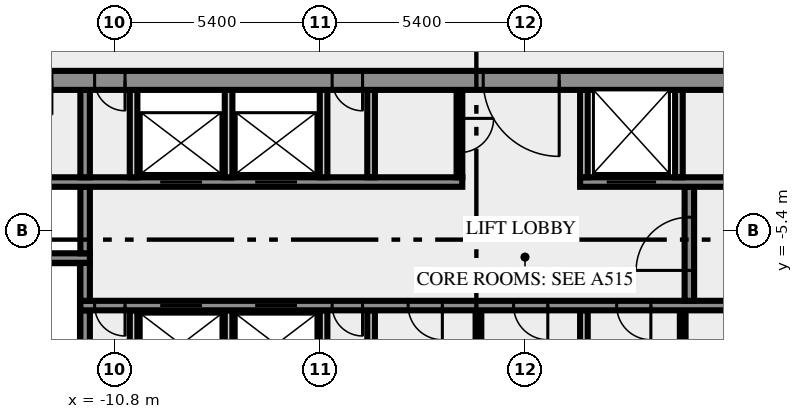
"""IFC4 building model, lengths in metres.
Left out: names, types, materials, properties, quantities, classifications, styles, units other than length and angle.
Written with IfcOpenShell. Run it as: python <this file> out.ifc"""

import sys

from ifc_helpers import new_model, si_unit, direction, frame, frame_2d, origin, place, context, subcontext, project, spatial, rectangle, extrude, element, fill, save


model = new_model("IFC4")
c1 = context("Model", 3, precision=1e-05, world=origin(), true_north=direction((0.0, 1.0)))
c2 = subcontext(c1, "Body", "Model", "MODEL_VIEW")
j1 = project(units=[si_unit("LENGTHUNIT", "METRE"), si_unit("PLANEANGLEUNIT", "RADIAN")], contexts=[c1])
p1 = place(None, origin())
s1 = spatial("IfcSite", under=j1, at=p1, CompositionType="ELEMENT")
p2 = place(p1, origin())
s2 = spatial("IfcBuilding", under=s1, at=p2, CompositionType="ELEMENT")
p3 = place(p2, frame((0.0, 0.0, 297.0)))
s3 = spatial("IfcBuildingStorey", under=s2, at=p3, CompositionType="ELEMENT", Elevation=297.0)
p4 = place(p3, frame((-11.575, -10.5, 0.0), z_axis=(0.0, 0.0, 1.0), x_axis=(0.0, 1.0, 0.0)))
e1 = element("IfcWall", 1, at=p4, inside=s3, PredefinedType="SHEAR", context=c2, shape_type="SweptSolid", body=[
    extrude(rectangle(XDim=3.0, YDim=0.25, at=frame_2d((1.5, 0.0))), origin(), (0.0, 0.0, 1.0), 3.4),
])
for number, where, z_axis, x_axis in (
    (2, (-10.3, -10.5, 0.0), (0.0, 0.0, 1.0), (0.0, 1.0, 0.0)),
    (3, (-7.8, -10.5, 0.0), (0.0, 0.0, 1.0), (0.0, 1.0, 0.0)),
    (4, (-5.3, -10.5, 0.0), (0.0, 0.0, 1.0), (0.0, 1.0, 0.0)),
    (5, (-4.05, -10.5, 0.0), (0.0, 0.0, 1.0), (0.0, 1.0, 0.0)),
):
    element("IfcWall", number, at=place(p3, frame(where, z_axis=z_axis, x_axis=x_axis)), inside=s3, PredefinedType="SOLIDWALL", context=c2, shape_type="SweptSolid", body=[
        extrude(rectangle(XDim=3.0, YDim=0.2, at=frame_2d((1.5, 0.0))), origin(), (0.0, 0.0, 1.0), 3.4),
    ])
p5 = place(p3, frame((-1.225, -10.5, 0.0), z_axis=(0.0, 0.0, 1.0), x_axis=(0.0, 1.0, 0.0)))
e6 = element("IfcWall", 6, at=p5, inside=s3, PredefinedType="PARTITIONING", context=c2, shape_type="SweptSolid", body=[
    extrude(rectangle(XDim=3.0, YDim=0.15, at=frame_2d((1.5, 0.0))), origin(), (0.0, 0.0, 1.0), 3.4),
])
p6 = place(p3, frame((1.55, -10.5, 0.0), z_axis=(0.0, 0.0, 1.0), x_axis=(0.0, 1.0, 0.0)))
e7 = element("IfcWall", 7, at=p6, inside=s3, PredefinedType="SOLIDWALL", context=c2, shape_type="SweptSolid", body=[
    extrude(rectangle(XDim=3.0, YDim=0.2, at=frame_2d((1.5, 0.0))), origin(), (0.0, 0.0, 1.0), 3.4),
])
p7 = place(p3, frame((4.15, -10.5, 0.0), z_axis=(0.0, 0.0, 1.0), x_axis=(0.0, 1.0, 0.0)))
e8 = element("IfcWall", 8, at=p7, inside=s3, PredefinedType="PARTITIONING", context=c2, shape_type="SweptSolid", body=[
    extrude(rectangle(XDim=3.0, YDim=0.15, at=frame_2d((1.5, 0.0))), origin(), (0.0, 0.0, 1.0), 3.4),
])
p8 = place(p3, frame((11.7, -7.375, 0.0), z_axis=(0.0, 0.0, 1.0), x_axis=(-1.0, 0.0, 0.0)))
e9 = element("IfcWall", 9, at=p8, inside=s3, PredefinedType="SHEAR", context=c2, shape_type="SweptSolid", body=[
    extrude(rectangle(XDim=23.4, YDim=0.25, at=frame_2d((11.7, 0.0))), origin(), (0.0, 0.0, 1.0), 3.4),
])
p9 = place(p8, frame((22.225, 0.0, 0.0)))
e10 = element("IfcOpeningElement", 10, at=p9, cuts=e9, PredefinedType="OPENING", context=c2, shape_type="SweptSolid", body=[
    extrude(rectangle(XDim=0.8, YDim=2.1, at=frame_2d((0.4, 1.05))), frame((0.0, 0.135, 0.0), z_axis=(0.0, -1.0, 0.0), x_axis=(1.0, 0.0, 0.0)), (0.0, 0.0, 1.0), 0.27),
])
p10 = place(p8, frame((20.2, 0.0, 0.0)))
e11 = element("IfcOpeningElement", 11, at=p10, cuts=e9, PredefinedType="OPENING", context=c2, shape_type="SweptSolid", body=[
    extrude(rectangle(XDim=1.1, YDim=2.1, at=frame_2d((0.55, 1.05))), frame((0.0, 0.135, 0.0), z_axis=(0.0, -1.0, 0.0), x_axis=(1.0, 0.0, 0.0)), (0.0, 0.0, 1.0), 0.27),
])
p11 = place(p8, frame((17.7, 0.0, 0.0)))
e12 = element("IfcOpeningElement", 12, at=p11, cuts=e9, PredefinedType="OPENING", context=c2, shape_type="SweptSolid", body=[
    extrude(rectangle(XDim=1.1, YDim=2.1, at=frame_2d((0.55, 1.05))), frame((0.0, 0.135, 0.0), z_axis=(0.0, -1.0, 0.0), x_axis=(1.0, 0.0, 0.0)), (0.0, 0.0, 1.0), 0.27),
])
p12 = place(p8, frame((15.975, 0.0, 0.0)))
e13 = element("IfcOpeningElement", 13, at=p12, cuts=e9, PredefinedType="OPENING", context=c2, shape_type="SweptSolid", body=[
    extrude(rectangle(XDim=0.8, YDim=2.1, at=frame_2d((0.4, 1.05))), frame((0.0, 0.135, 0.0), z_axis=(0.0, -1.0, 0.0), x_axis=(1.0, 0.0, 0.0)), (0.0, 0.0, 1.0), 0.27),
])
p13 = place(p8, frame((13.875, 0.0, 0.0)))
e14 = element("IfcOpeningElement", 14, at=p13, cuts=e9, PredefinedType="OPENING", context=c2, shape_type="SweptSolid", body=[
    extrude(rectangle(XDim=0.9, YDim=2.1, at=frame_2d((0.45, 1.05))), frame((0.0, 0.135, 0.0), z_axis=(0.0, -1.0, 0.0), x_axis=(1.0, 0.0, 0.0)), (0.0, 0.0, 1.0), 0.27),
])
p14 = place(p8, frame((11.1, 0.0, 0.0)))
e15 = element("IfcOpeningElement", 15, at=p14, cuts=e9, PredefinedType="OPENING", context=c2, shape_type="SweptSolid", body=[
    extrude(rectangle(XDim=0.9, YDim=2.1, at=frame_2d((0.45, 1.05))), frame((0.0, 0.135, 0.0), z_axis=(0.0, -1.0, 0.0), x_axis=(1.0, 0.0, 0.0)), (0.0, 0.0, 1.0), 0.27),
])
p15 = place(p8, frame((8.388, 0.0, 0.0)))
e16 = element("IfcOpeningElement", 16, at=p15, cuts=e9, PredefinedType="OPENING", context=c2, shape_type="SweptSolid", body=[
    extrude(rectangle(XDim=0.9, YDim=2.1, at=frame_2d((0.45, 1.05))), frame((0.0, 0.135, 0.0), z_axis=(0.0, -1.0, 0.0), x_axis=(1.0, 0.0, 0.0)), (0.0, 0.0, 1.0), 0.27),
])
p16 = place(p8, frame((5.375, 0.0, 0.0)))
e17 = element("IfcOpeningElement", 17, at=p16, cuts=e9, PredefinedType="OPENING", context=c2, shape_type="SweptSolid", body=[
    extrude(rectangle(XDim=0.9, YDim=2.1, at=frame_2d((0.45, 1.05))), frame((0.0, 0.135, 0.0), z_axis=(0.0, -1.0, 0.0), x_axis=(1.0, 0.0, 0.0)), (0.0, 0.0, 1.0), 0.27),
])
p17 = place(p8, frame((1.688, 0.0, 0.0)))
e18 = element("IfcOpeningElement", 18, at=p17, cuts=e9, PredefinedType="OPENING", context=c2, shape_type="SweptSolid", body=[
    extrude(rectangle(XDim=0.9, YDim=2.1, at=frame_2d((0.45, 1.05))), frame((0.0, 0.135, 0.0), z_axis=(0.0, -1.0, 0.0), x_axis=(1.0, 0.0, 0.0)), (0.0, 0.0, 1.0), 0.27),
])
p18 = place(p3, frame((-11.575, -7.25, 0.0), z_axis=(0.0, 0.0, 1.0), x_axis=(0.0, 1.0, 0.0)))
e19 = element("IfcWall", 19, at=p18, inside=s3, PredefinedType="SHEAR", context=c2, shape_type="SweptSolid", body=[
    extrude(rectangle(XDim=1.0, YDim=0.25, at=frame_2d((0.5, 0.0))), origin(), (0.0, 0.0, 1.0), 3.4),
])
p19 = place(p3, frame((4.325, -7.25, 0.0), z_axis=(0.0, 0.0, 1.0), x_axis=(0.0, 1.0, 0.0)))
e20 = element("IfcWall", 20, at=p19, inside=s3, PredefinedType="SHEAR", context=c2, shape_type="SweptSolid", body=[
    extrude(rectangle(XDim=3.0, YDim=0.25, at=frame_2d((1.5, 0.0))), origin(), (0.0, 0.0, 1.0), 3.4),
])
p20 = place(p19, frame((0.8, 0.0, 0.0)))
e21 = element("IfcOpeningElement", 21, at=p20, cuts=e20, PredefinedType="OPENING", context=c2, shape_type="SweptSolid", body=[
    extrude(rectangle(XDim=1.4, YDim=2.1, at=frame_2d((0.7, 1.05))), frame((0.0, 0.135, 0.0), z_axis=(0.0, -1.0, 0.0), x_axis=(1.0, 0.0, 0.0)), (0.0, 0.0, 1.0), 0.27),
])
p21 = place(p3, frame((-11.45, -6.125, 0.0), z_axis=(0.0, 0.0, 1.0), x_axis=(-1.0, 0.0, 0.0)))
e22 = element("IfcWall", 22, at=p21, inside=s3, PredefinedType="SHEAR", context=c2, shape_type="SweptSolid", body=[
    extrude(rectangle(XDim=8.05, YDim=0.25, at=frame_2d((4.025, 0.0))), origin(), (0.0, 0.0, 1.0), 3.4),
])
p22 = place(p21, frame((6.2, 0.0, 0.0)))
e23 = element("IfcOpeningElement", 23, at=p22, cuts=e22, PredefinedType="OPENING", context=c2, shape_type="SweptSolid", body=[
    extrude(rectangle(XDim=1.8, YDim=2.1, at=frame_2d((0.9, 1.05))), frame((0.0, 0.135, 0.0), z_axis=(0.0, -1.0, 0.0), x_axis=(1.0, 0.0, 0.0)), (0.0, 0.0, 1.0), 0.27),
])
p23 = place(p3, frame((-11.575, -6.0, 0.0), z_axis=(0.0, 0.0, 1.0), x_axis=(0.0, 1.0, 0.0)))
e24 = element("IfcWall", 24, at=p23, inside=s3, PredefinedType="SHEAR", context=c2, shape_type="SweptSolid", body=[
    extrude(rectangle(XDim=1.75, YDim=0.25, at=frame_2d((0.875, 0.0))), origin(), (0.0, 0.0, 1.0), 3.4),
])
p24 = place(p3, frame((-14.35, -4.125, 0.0), z_axis=(0.0, 0.0, 1.0), x_axis=(1.0, 0.0, 0.0)))
e25 = element("IfcWall", 25, at=p24, inside=s3, PredefinedType="SHEAR", context=c2, shape_type="SweptSolid", body=[
    extrude(rectangle(XDim=12.7, YDim=0.25, at=frame_2d((6.35, 0.0))), origin(), (0.0, 0.0, 1.0), 3.4),
])
p25 = place(p24, frame((4.75, 0.0, 0.0)))
e26 = element("IfcOpeningElement", 26, at=p25, cuts=e25, PredefinedType="OPENING", context=c2, shape_type="SweptSolid", body=[
    extrude(rectangle(XDim=1.1, YDim=2.1, at=frame_2d((0.55, 1.05))), frame((0.0, 0.135, 0.0), z_axis=(0.0, -1.0, 0.0), x_axis=(1.0, 0.0, 0.0)), (0.0, 0.0, 1.0), 0.27),
])
p26 = place(p24, frame((7.25, 0.0, 0.0)))
e27 = element("IfcOpeningElement", 27, at=p26, cuts=e25, PredefinedType="OPENING", context=c2, shape_type="SweptSolid", body=[
    extrude(rectangle(XDim=1.1, YDim=2.1, at=frame_2d((0.55, 1.05))), frame((0.0, 0.135, 0.0), z_axis=(0.0, -1.0, 0.0), x_axis=(1.0, 0.0, 0.0)), (0.0, 0.0, 1.0), 0.27),
])
p27 = place(p3, frame((1.45, -4.125, 0.0), z_axis=(0.0, 0.0, 1.0), x_axis=(1.0, 0.0, 0.0)))
e28 = element("IfcWall", 28, at=p27, inside=s3, PredefinedType="SHEAR", context=c2, shape_type="SweptSolid", body=[
    extrude(rectangle(XDim=12.9, YDim=0.25, at=frame_2d((6.45, 0.0))), origin(), (0.0, 0.0, 1.0), 3.4),
])
p28 = place(p27, frame((0.7, 0.0, 0.0)))
e29 = element("IfcOpeningElement", 29, at=p28, cuts=e28, PredefinedType="OPENING", context=c2, shape_type="SweptSolid", body=[
    extrude(rectangle(XDim=1.3, YDim=2.1, at=frame_2d((0.65, 1.05))), frame((0.0, 0.135, 0.0), z_axis=(0.0, -1.0, 0.0), x_axis=(1.0, 0.0, 0.0)), (0.0, 0.0, 1.0), 0.27),
])
p29 = place(p3, frame((-11.575, -4.0, 0.0), z_axis=(0.0, 0.0, 1.0), x_axis=(0.0, 1.0, 0.0)))
e30 = element("IfcWall", 30, at=p29, inside=s3, PredefinedType="SHEAR", context=c2, shape_type="SweptSolid", body=[
    extrude(rectangle(XDim=2.3, YDim=0.25, at=frame_2d((1.15, 0.0))), origin(), (0.0, 0.0, 1.0), 3.4),
])
for number, where, z_axis, x_axis in (
    (31, (-10.3, -4.0, 0.0), (0.0, 0.0, 1.0), (0.0, 1.0, 0.0)),
    (32, (-7.8, -4.0, 0.0), (0.0, 0.0, 1.0), (0.0, 1.0, 0.0)),
    (33, (-5.3, -4.0, 0.0), (0.0, 0.0, 1.0), (0.0, 1.0, 0.0)),
    (34, (-4.05, -4.0, 0.0), (0.0, 0.0, 1.0), (0.0, 1.0, 0.0)),
):
    element("IfcWall", number, at=place(p3, frame(where, z_axis=z_axis, x_axis=x_axis)), inside=s3, PredefinedType="SOLIDWALL", context=c2, shape_type="SweptSolid", body=[
        extrude(rectangle(XDim=2.3, YDim=0.2, at=frame_2d((1.15, 0.0))), origin(), (0.0, 0.0, 1.0), 3.4),
    ])
p30 = place(p3, frame((-1.725, -1.7, 0.0), z_axis=(0.0, 0.0, 1.0), x_axis=(0.0, -1.0, 0.0)))
e35 = element("IfcWall", 35, at=p30, inside=s3, PredefinedType="PARTITIONING", context=c2, shape_type="SweptSolid", body=[
    extrude(rectangle(XDim=2.3, YDim=0.15, at=frame_2d((1.15, 0.0))), origin(), (0.0, 0.0, 1.0), 3.4),
])
p31 = place(p30, frame((0.75, 0.0, 0.0)))
e36 = element("IfcOpeningElement", 36, at=p31, cuts=e35, PredefinedType="OPENING", context=c2, shape_type="SweptSolid", body=[
    extrude(rectangle(XDim=0.9, YDim=2.1, at=frame_2d((0.45, 1.05))), frame((0.0, 0.085, 0.0), z_axis=(0.0, -1.0, 0.0), x_axis=(1.0, 0.0, 0.0)), (0.0, 0.0, 1.0), 0.17),
])
for number, where, z_axis, x_axis in (
    (37, (1.55, -4.0, 0.0), (0.0, 0.0, 1.0), (0.0, 1.0, 0.0)),
    (38, (4.05, -4.0, 0.0), (0.0, 0.0, 1.0), (0.0, 1.0, 0.0)),
):
    element("IfcWall", number, at=place(p3, frame(where, z_axis=z_axis, x_axis=x_axis)), inside=s3, PredefinedType="SOLIDWALL", context=c2, shape_type="SweptSolid", body=[
        extrude(rectangle(XDim=2.3, YDim=0.2, at=frame_2d((1.15, 0.0))), origin(), (0.0, 0.0, 1.0), 3.4),
    ])
p32 = place(p3, frame((20.49, -1.45, 0.0), z_axis=(0.0, 0.0, 1.0), x_axis=(-1.0, 0.0, 0.0)))
e39 = element("IfcWall", 39, at=p32, inside=s3, PredefinedType="SHEAR", context=c2, shape_type="SweptSolid", body=[
    extrude(rectangle(XDim=40.98, YDim=0.5, at=frame_2d((20.49, 0.0))), origin(), (0.0, 0.0, 1.0), 3.4),
])
p33 = place(p32, frame((38.14, 0.0, 0.0)))
e40 = element("IfcOpeningElement", 40, at=p33, cuts=e39, PredefinedType="OPENING", context=c2, shape_type="SweptSolid", body=[
    extrude(rectangle(XDim=1.8, YDim=2.1, at=frame_2d((0.9, 1.05))), frame((0.0, 0.26, 0.0), z_axis=(0.0, -1.0, 0.0), x_axis=(1.0, 0.0, 0.0)), (0.0, 0.0, 1.0), 0.52),
])
p34 = place(p32, frame((36.728, 0.0, 0.0)))
e41 = element("IfcOpeningElement", 41, at=p34, cuts=e39, PredefinedType="OPENING", context=c2, shape_type="SweptSolid", body=[
    extrude(rectangle(XDim=0.8, YDim=2.1, at=frame_2d((0.4, 1.05))), frame((0.0, 0.26, 0.0), z_axis=(0.0, -1.0, 0.0), x_axis=(1.0, 0.0, 0.0)), (0.0, 0.0, 1.0), 0.52),
])
p35 = place(p32, frame((35.153, 0.0, 0.0)))
e42 = element("IfcOpeningElement", 42, at=p35, cuts=e39, PredefinedType="OPENING", context=c2, shape_type="SweptSolid", body=[
    extrude(rectangle(XDim=0.8, YDim=2.1, at=frame_2d((0.4, 1.05))), frame((0.0, 0.26, 0.0), z_axis=(0.0, -1.0, 0.0), x_axis=(1.0, 0.0, 0.0)), (0.0, 0.0, 1.0), 0.52),
])
p36 = place(p32, frame((32.94, 0.0, 0.0)))
e43 = element("IfcOpeningElement", 43, at=p36, cuts=e39, PredefinedType="OPENING", context=c2, shape_type="SweptSolid", body=[
    extrude(rectangle(XDim=0.9, YDim=2.1, at=frame_2d((0.45, 1.05))), frame((0.0, 0.26, 0.0), z_axis=(0.0, -1.0, 0.0), x_axis=(1.0, 0.0, 0.0)), (0.0, 0.0, 1.0), 0.52),
])
p37 = place(p32, frame((31.015, 0.0, 0.0)))
e44 = element("IfcOpeningElement", 44, at=p37, cuts=e39, PredefinedType="OPENING", context=c2, shape_type="SweptSolid", body=[
    extrude(rectangle(XDim=0.8, YDim=2.1, at=frame_2d((0.4, 1.05))), frame((0.0, 0.26, 0.0), z_axis=(0.0, -1.0, 0.0), x_axis=(1.0, 0.0, 0.0)), (0.0, 0.0, 1.0), 0.52),
])
p38 = place(p32, frame((24.765, 0.0, 0.0)))
e45 = element("IfcOpeningElement", 45, at=p38, cuts=e39, PredefinedType="OPENING", context=c2, shape_type="SweptSolid", body=[
    extrude(rectangle(XDim=0.8, YDim=2.1, at=frame_2d((0.4, 1.05))), frame((0.0, 0.26, 0.0), z_axis=(0.0, -1.0, 0.0), x_axis=(1.0, 0.0, 0.0)), (0.0, 0.0, 1.0), 0.52),
])
p39 = place(p32, frame((19.59, 0.0, 0.0)))
e46 = element("IfcOpeningElement", 46, at=p39, cuts=e39, PredefinedType="OPENING", context=c2, shape_type="SweptSolid", body=[
    extrude(rectangle(XDim=2.0, YDim=2.1, at=frame_2d((1.0, 1.05))), frame((0.0, 0.26, 0.0), z_axis=(0.0, -1.0, 0.0), x_axis=(1.0, 0.0, 0.0)), (0.0, 0.0, 1.0), 0.52),
])
p40 = place(p32, frame((14.202, 0.0, 0.0)))
e47 = element("IfcOpeningElement", 47, at=p40, cuts=e39, PredefinedType="OPENING", context=c2, shape_type="SweptSolid", body=[
    extrude(rectangle(XDim=0.9, YDim=2.1, at=frame_2d((0.45, 1.05))), frame((0.0, 0.26, 0.0), z_axis=(0.0, -1.0, 0.0), x_axis=(1.0, 0.0, 0.0)), (0.0, 0.0, 1.0), 0.52),
])
p41 = place(p32, frame((10.478, 0.0, 0.0)))
e48 = element("IfcOpeningElement", 48, at=p41, cuts=e39, PredefinedType="OPENING", context=c2, shape_type="SweptSolid", body=[
    extrude(rectangle(XDim=0.9, YDim=2.1, at=frame_2d((0.45, 1.05))), frame((0.0, 0.26, 0.0), z_axis=(0.0, -1.0, 0.0), x_axis=(1.0, 0.0, 0.0)), (0.0, 0.0, 1.0), 0.52),
])
p42 = place(p32, frame((7.14, 0.0, 0.0)))
e49 = element("IfcOpeningElement", 49, at=p42, cuts=e39, PredefinedType="OPENING", context=c2, shape_type="SweptSolid", body=[
    extrude(rectangle(XDim=0.9, YDim=2.1, at=frame_2d((0.45, 1.05))), frame((0.0, 0.26, 0.0), z_axis=(0.0, -1.0, 0.0), x_axis=(1.0, 0.0, 0.0)), (0.0, 0.0, 1.0), 0.52),
])
p43 = place(p32, frame((4.19, 0.0, 0.0)))
e50 = element("IfcOpeningElement", 50, at=p43, cuts=e39, PredefinedType="OPENING", context=c2, shape_type="SweptSolid", body=[
    extrude(rectangle(XDim=0.9, YDim=2.1, at=frame_2d((0.45, 1.05))), frame((0.0, 0.26, 0.0), z_axis=(0.0, -1.0, 0.0), x_axis=(1.0, 0.0, 0.0)), (0.0, 0.0, 1.0), 0.52),
])
p44 = place(p32, frame((1.04, 0.0, 0.0)))
e51 = element("IfcOpeningElement", 51, at=p44, cuts=e39, PredefinedType="OPENING", context=c2, shape_type="SweptSolid", body=[
    extrude(rectangle(XDim=1.8, YDim=2.1, at=frame_2d((0.9, 1.05))), frame((0.0, 0.26, 0.0), z_axis=(0.0, -1.0, 0.0), x_axis=(1.0, 0.0, 0.0)), (0.0, 0.0, 1.0), 0.52),
])
p45 = place(p9, origin())
e52 = element("IfcDoor", 52, at=p45, inside=s3, OperationType="SINGLE_SWING_RIGHT", PredefinedType="DOOR", context=c2, shape_type="SweptSolid", body=[
    extrude(rectangle(XDim=0.8, YDim=2.1, at=frame_2d((0.4, 1.05))), frame((0.0, 0.025, 0.0), z_axis=(0.0, -1.0, 0.0), x_axis=(1.0, 0.0, 0.0)), (0.0, 0.0, 1.0), 0.05),
])
fill(e10, e52)
p46 = place(p10, origin())
e53 = element("IfcDoor", 53, at=p46, inside=s3, OperationType="DOUBLE_DOOR_SLIDING", PredefinedType="DOOR", context=c2, shape_type="SweptSolid", body=[
    extrude(rectangle(XDim=1.1, YDim=2.1, at=frame_2d((0.55, 1.05))), frame((0.0, 0.025, 0.0), z_axis=(0.0, -1.0, 0.0), x_axis=(1.0, 0.0, 0.0)), (0.0, 0.0, 1.0), 0.05),
])
fill(e11, e53)
p47 = place(p11, origin())
e54 = element("IfcDoor", 54, at=p47, inside=s3, OperationType="DOUBLE_DOOR_SLIDING", PredefinedType="DOOR", context=c2, shape_type="SweptSolid", body=[
    extrude(rectangle(XDim=1.1, YDim=2.1, at=frame_2d((0.55, 1.05))), frame((0.0, 0.025, 0.0), z_axis=(0.0, -1.0, 0.0), x_axis=(1.0, 0.0, 0.0)), (0.0, 0.0, 1.0), 0.05),
])
fill(e12, e54)
p48 = place(p12, origin())
e55 = element("IfcDoor", 55, at=p48, inside=s3, OperationType="SINGLE_SWING_RIGHT", PredefinedType="DOOR", context=c2, shape_type="SweptSolid", body=[
    extrude(rectangle(XDim=0.8, YDim=2.1, at=frame_2d((0.4, 1.05))), frame((0.0, 0.025, 0.0), z_axis=(0.0, -1.0, 0.0), x_axis=(1.0, 0.0, 0.0)), (0.0, 0.0, 1.0), 0.05),
])
fill(e13, e55)
p49 = place(p13, origin())
e56 = element("IfcDoor", 56, at=p49, inside=s3, OperationType="SINGLE_SWING_RIGHT", PredefinedType="DOOR", context=c2, shape_type="SweptSolid", body=[
    extrude(rectangle(XDim=0.9, YDim=2.1, at=frame_2d((0.45, 1.05))), frame((0.0, 0.025, 0.0), z_axis=(0.0, -1.0, 0.0), x_axis=(1.0, 0.0, 0.0)), (0.0, 0.0, 1.0), 0.05),
])
fill(e14, e56)
p50 = place(p14, origin())
e57 = element("IfcDoor", 57, at=p50, inside=s3, OperationType="SINGLE_SWING_LEFT", PredefinedType="DOOR", context=c2, shape_type="SweptSolid", body=[
    extrude(rectangle(XDim=0.9, YDim=2.1, at=frame_2d((0.45, 1.05))), frame((0.0, 0.025, 0.0), z_axis=(0.0, -1.0, 0.0), x_axis=(1.0, 0.0, 0.0)), (0.0, 0.0, 1.0), 0.05),
])
fill(e15, e57)
p51 = place(p15, origin())
e58 = element("IfcDoor", 58, at=p51, inside=s3, OperationType="SINGLE_SWING_LEFT", PredefinedType="DOOR", context=c2, shape_type="SweptSolid", body=[
    extrude(rectangle(XDim=0.9, YDim=2.1, at=frame_2d((0.45, 1.05))), frame((0.0, 0.025, 0.0), z_axis=(0.0, -1.0, 0.0), x_axis=(1.0, 0.0, 0.0)), (0.0, 0.0, 1.0), 0.05),
])
fill(e16, e58)
p52 = place(p20, origin())
e59 = element("IfcDoor", 59, at=p52, inside=s3, OperationType="DOUBLE_DOOR_SINGLE_SWING", PredefinedType="DOOR", context=c2, shape_type="SweptSolid", body=[
    extrude(rectangle(XDim=1.4, YDim=2.1, at=frame_2d((0.7, 1.05))), frame((0.0, 0.025, 0.0), z_axis=(0.0, -1.0, 0.0), x_axis=(1.0, 0.0, 0.0)), (0.0, 0.0, 1.0), 0.05),
])
fill(e21, e59)
p53 = place(p25, origin())
e60 = element("IfcDoor", 60, at=p53, inside=s3, OperationType="DOUBLE_DOOR_SLIDING", PredefinedType="DOOR", context=c2, shape_type="SweptSolid", body=[
    extrude(rectangle(XDim=1.1, YDim=2.1, at=frame_2d((0.55, 1.05))), frame((0.0, 0.025, 0.0), z_axis=(0.0, -1.0, 0.0), x_axis=(1.0, 0.0, 0.0)), (0.0, 0.0, 1.0), 0.05),
])
fill(e26, e60)
p54 = place(p26, origin())
e61 = element("IfcDoor", 61, at=p54, inside=s3, OperationType="DOUBLE_DOOR_SLIDING", PredefinedType="DOOR", context=c2, shape_type="SweptSolid", body=[
    extrude(rectangle(XDim=1.1, YDim=2.1, at=frame_2d((0.55, 1.05))), frame((0.0, 0.025, 0.0), z_axis=(0.0, -1.0, 0.0), x_axis=(1.0, 0.0, 0.0)), (0.0, 0.0, 1.0), 0.05),
])
fill(e27, e61)
p55 = place(p28, origin())
e62 = element("IfcDoor", 62, at=p55, inside=s3, OperationType="DOUBLE_DOOR_SLIDING", PredefinedType="DOOR", context=c2, shape_type="SweptSolid", body=[
    extrude(rectangle(XDim=1.3, YDim=2.1, at=frame_2d((0.65, 1.05))), frame((0.0, 0.025, 0.0), z_axis=(0.0, -1.0, 0.0), x_axis=(1.0, 0.0, 0.0)), (0.0, 0.0, 1.0), 0.05),
])
fill(e29, e62)
p56 = place(p31, origin())
e63 = element("IfcDoor", 63, at=p56, inside=s3, OperationType="SINGLE_SWING_RIGHT", PredefinedType="DOOR", context=c2, shape_type="SweptSolid", body=[
    extrude(rectangle(XDim=0.9, YDim=2.1, at=frame_2d((0.45, 1.05))), frame((0.0, 0.025, 0.0), z_axis=(0.0, -1.0, 0.0), x_axis=(1.0, 0.0, 0.0)), (0.0, 0.0, 1.0), 0.05),
])
fill(e36, e63)
p57 = place(p37, origin())
e64 = element("IfcDoor", 64, at=p57, inside=s3, OperationType="SINGLE_SWING_RIGHT", PredefinedType="DOOR", context=c2, shape_type="SweptSolid", body=[
    extrude(rectangle(XDim=0.8, YDim=2.1, at=frame_2d((0.4, 1.05))), frame((0.0, 0.025, 0.0), z_axis=(0.0, -1.0, 0.0), x_axis=(1.0, 0.0, 0.0)), (0.0, 0.0, 1.0), 0.05),
])
fill(e44, e64)
p58 = place(p38, origin())
e65 = element("IfcDoor", 65, at=p58, inside=s3, OperationType="SINGLE_SWING_RIGHT", PredefinedType="DOOR", context=c2, shape_type="SweptSolid", body=[
    extrude(rectangle(XDim=0.8, YDim=2.1, at=frame_2d((0.4, 1.05))), frame((0.0, 0.025, 0.0), z_axis=(0.0, -1.0, 0.0), x_axis=(1.0, 0.0, 0.0)), (0.0, 0.0, 1.0), 0.05),
])
fill(e45, e65)
p59 = place(p39, origin())
e66 = element("IfcDoor", 66, at=p59, inside=s3, OperationType="DOUBLE_DOOR_SINGLE_SWING", PredefinedType="DOOR", context=c2, shape_type="SweptSolid", body=[
    extrude(rectangle(XDim=2.0, YDim=2.1, at=frame_2d((1.0, 1.05))), frame((0.0, 0.025, 0.0), z_axis=(0.0, -1.0, 0.0), x_axis=(1.0, 0.0, 0.0)), (0.0, 0.0, 1.0), 0.05),
])
fill(e46, e66)
save(model, sys.argv[1])
